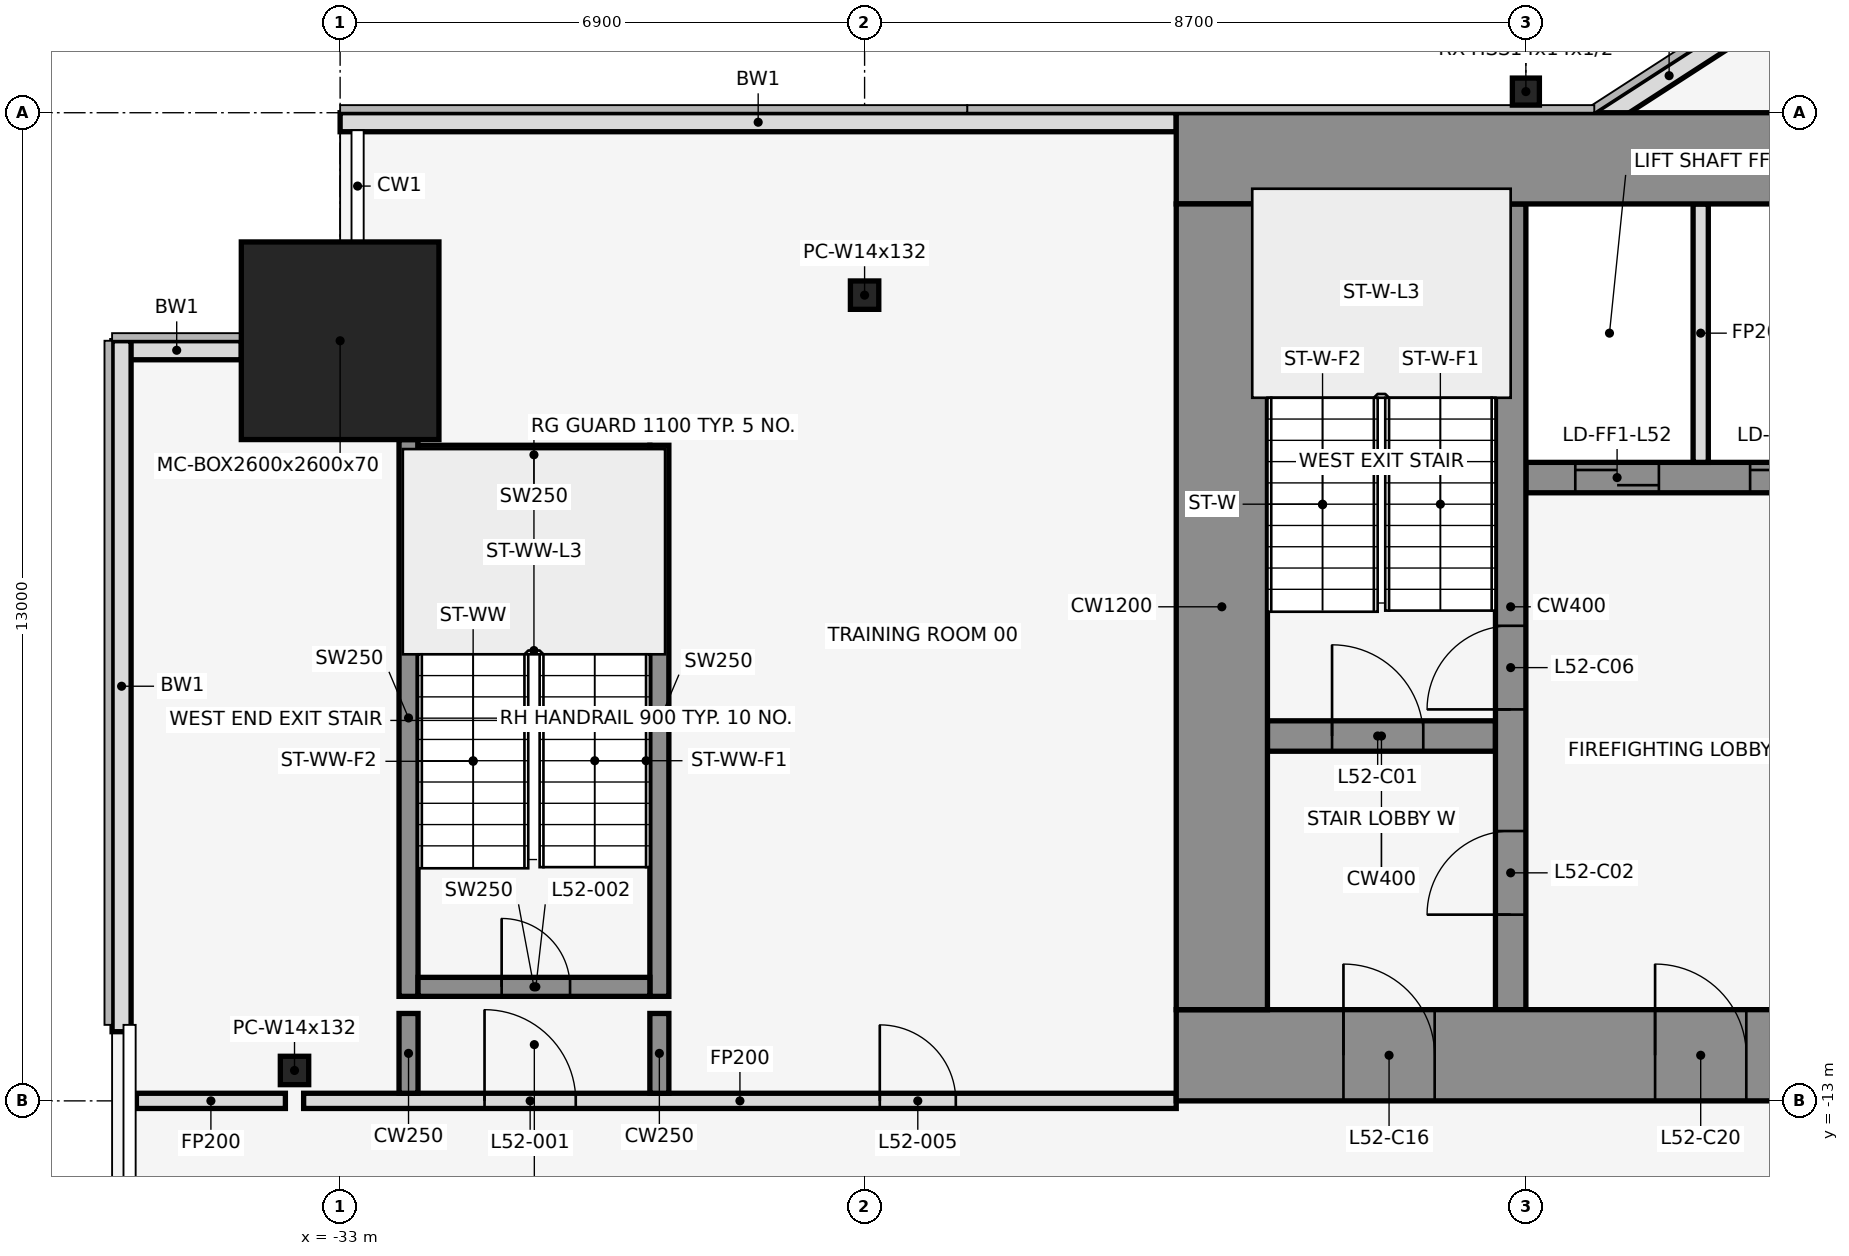
"""IFC4 building model, lengths in metres.
Left out: names, types, materials, properties, quantities, classifications, styles, units other than length and angle.
Written with IfcOpenShell. Run it as: python <this file> out.ifc"""

import sys

from ifc_helpers import new_model, si_unit, direction, frame, frame_2d, origin, origin_2d, place, context, subcontext, project, spatial, rectangle, hollow_rectangle, i_section, extrude, element, fill, save


model = new_model("IFC4")
c1 = context("Model", 3, precision=1e-05, world=origin(), true_north=direction((0.0, 1.0)))
c2 = subcontext(c1, "Body", "Model", "MODEL_VIEW")
j1 = project(units=[si_unit("LENGTHUNIT", "METRE"), si_unit("PLANEANGLEUNIT", "RADIAN")], contexts=[c1])
p1 = place(None, origin())
s1 = spatial("IfcSite", under=j1, at=p1, CompositionType="ELEMENT")
p2 = place(p1, origin())
s2 = spatial("IfcBuilding", under=s1, at=p2, CompositionType="ELEMENT")
p3 = place(p2, frame((0.0, 0.0, 231.9)))
s3 = spatial("IfcBuildingStorey", under=s2, at=p3, CompositionType="ELEMENT", Elevation=231.9)
p4 = place(p3, frame((-33.0, -3.0, 0.0), z_axis=(0.0, 0.0, 1.0), x_axis=(1.0, 0.0, 0.0)))
e1 = element("IfcColumn", 1, at=p4, inside=s3, PredefinedType="COLUMN", context=c2, shape_type="SweptSolid", body=[
    extrude(hollow_rectangle(XDim=2.6, YDim=2.6, WallThickness=0.07, at=origin_2d()), origin(), (0.0, 0.0, 1.0), 4.1),
])
p5 = place(p3, frame((-26.1, -2.4, 0.0), z_axis=(0.0, 0.0, 1.0), x_axis=(1.0, 0.0, 0.0)))
e2 = element("IfcColumn", 2, at=p5, inside=s3, PredefinedType="COLUMN", context=c2, shape_type="SweptSolid", body=[
    extrude(i_section(OverallWidth=0.373, OverallDepth=0.373, WebThickness=0.016, FlangeThickness=0.026, at=origin_2d()), origin(), (0.0, 0.0, 1.0), 4.1),
])
p6 = place(p3, frame((-17.4, 0.278, 0.0), z_axis=(0.0, 0.0, 1.0), x_axis=(1.0, 0.0, 0.0)))
e3 = element("IfcColumn", 3, at=p6, inside=s3, PredefinedType="COLUMN", context=c2, shape_type="SweptSolid", body=[
    extrude(hollow_rectangle(XDim=0.356, YDim=0.356, WallThickness=0.012, at=origin_2d()), origin(), (0.0, 0.0, 1.0), 4.1),
])
p7 = place(p3, frame((-33.6, -12.6, 0.0), z_axis=(0.0, 0.0, 1.0), x_axis=(1.0, 0.0, 0.0)))
e4 = element("IfcColumn", 4, at=p7, inside=s3, PredefinedType="COLUMN", context=c2, shape_type="SweptSolid", body=[
    extrude(i_section(OverallWidth=0.373, OverallDepth=0.373, WebThickness=0.016, FlangeThickness=0.026, at=origin_2d()), origin(), (0.0, 0.0, 1.0), 4.1),
])
p8 = place(p3, frame((-14.599, 1.08, 0.0), z_axis=(0.0, 0.0, 1.0), x_axis=(-0.83981312244, -0.542875602121, 0.0)))
e5 = element("IfcWall", 5, at=p8, inside=s3, PredefinedType="STANDARD", context=c2, shape_type="SweptSolid", body=[
    extrude(rectangle(XDim=2.183, YDim=0.25, at=frame_2d((1.091, 0.0))), origin(), (0.0, 0.0, 1.0), 3.9),
])
p9 = place(p3, frame((-22.0, -0.125, 0.0), z_axis=(0.0, 0.0, 1.0), x_axis=(-1.0, 0.0, 0.0)))
e6 = element("IfcWall", 6, at=p9, inside=s3, PredefinedType="STANDARD", context=c2, shape_type="SweptSolid", body=[
    extrude(rectangle(XDim=11.0, YDim=0.25, at=frame_2d((5.5, 0.0))), origin(), (0.0, 0.0, 1.0), 3.9),
])
p10 = place(p3, frame((-34.3, -3.125, 0.0), z_axis=(0.0, 0.0, 1.0), x_axis=(-1.0, 0.0, 0.0)))
e7 = element("IfcWall", 7, at=p10, inside=s3, PredefinedType="STANDARD", context=c2, shape_type="SweptSolid", body=[
    extrude(rectangle(XDim=1.7, YDim=0.25, at=frame_2d((0.85, 0.0))), origin(), (0.0, 0.0, 1.0), 3.9),
])
p11 = place(p3, frame((-35.875, -3.0, 0.0), z_axis=(0.0, 0.0, 1.0), x_axis=(0.0, -1.0, 0.0)))
e8 = element("IfcWall", 8, at=p11, inside=s3, PredefinedType="STANDARD", context=c2, shape_type="SweptSolid", body=[
    extrude(rectangle(XDim=9.09, YDim=0.25, at=frame_2d((4.545, 0.0))), origin(), (0.0, 0.0, 1.0), 3.9),
])
p12 = place(p3, frame((-32.1, -11.625, 0.0), z_axis=(0.0, 0.0, 1.0), x_axis=(0.0, 1.0, 0.0)))
e9 = element("IfcWall", 9, at=p12, inside=s3, PredefinedType="SHEAR", context=c2, shape_type="SweptSolid", body=[
    extrude(rectangle(XDim=7.325, YDim=0.25, at=frame_2d((3.663, 0.0))), origin(), (0.0, 0.0, 1.0), 4.1),
])
p13 = place(p3, frame((-28.8, -11.625, 0.0), z_axis=(0.0, 0.0, 1.0), x_axis=(0.0, 1.0, 0.0)))
e10 = element("IfcWall", 10, at=p13, inside=s3, PredefinedType="SHEAR", context=c2, shape_type="SweptSolid", body=[
    extrude(rectangle(XDim=7.25, YDim=0.25, at=frame_2d((3.625, 0.0))), origin(), (0.0, 0.0, 1.0), 4.1),
])
p14 = place(p3, frame((-31.975, -11.5, 0.0), z_axis=(0.0, 0.0, 1.0), x_axis=(1.0, 0.0, 0.0)))
e11 = element("IfcWall", 11, at=p14, inside=s3, PredefinedType="SHEAR", context=c2, shape_type="SweptSolid", body=[
    extrude(rectangle(XDim=3.05, YDim=0.25, at=frame_2d((1.525, 0.0))), origin(), (0.0, 0.0, 1.0), 4.1),
])
p15 = place(p14, frame((1.1, 0.0, 0.0)))
e12 = element("IfcOpeningElement", 12, at=p15, cuts=e11, PredefinedType="OPENING", context=c2, shape_type="SweptSolid", body=[
    extrude(rectangle(XDim=0.9, YDim=2.1, at=frame_2d((0.45, 1.05))), frame((0.0, 0.137, 0.0), z_axis=(0.0, -1.0, 0.0), x_axis=(1.0, 0.0, 0.0)), (0.0, 0.0, 1.0), 0.274),
])
p16 = place(p3, frame((-31.975, -4.5, 0.0), z_axis=(0.0, 0.0, 1.0), x_axis=(1.0, 0.0, 0.0)))
e13 = element("IfcWall", 13, at=p16, inside=s3, PredefinedType="SHEAR", context=c2, shape_type="SweptSolid", body=[
    extrude(rectangle(XDim=3.05, YDim=0.25, at=frame_2d((1.525, 0.0))), origin(), (0.0, 0.0, 1.0), 4.1),
])
p17 = place(p3, frame((-35.68, -13.0, 0.0), z_axis=(0.0, 0.0, 1.0), x_axis=(1.0, 0.0, 0.0)))
e14 = element("IfcWall", 14, at=p17, inside=s3, PredefinedType="PARTITIONING", context=c2, shape_type="SweptSolid", body=[
    extrude(rectangle(XDim=1.96, YDim=0.2, at=frame_2d((0.98, 0.0))), origin(), (0.0, 0.0, 1.0), 2.79),
])
p18 = place(p3, frame((-33.48, -13.0, 0.0), z_axis=(0.0, 0.0, 1.0), x_axis=(1.0, 0.0, 0.0)))
e15 = element("IfcWall", 15, at=p18, inside=s3, PredefinedType="PARTITIONING", context=c2, shape_type="SweptSolid", body=[
    extrude(rectangle(XDim=11.48, YDim=0.2, at=frame_2d((5.74, 0.0))), origin(), (0.0, 0.0, 1.0), 2.79),
])
p19 = place(p18, frame((2.38, 0.0, 0.0)))
e16 = element("IfcOpeningElement", 16, at=p19, cuts=e15, PredefinedType="OPENING", context=c2, shape_type="SweptSolid", body=[
    extrude(rectangle(XDim=1.2, YDim=2.1, at=frame_2d((0.6, 1.05))), frame((0.0, 0.112, 0.0), z_axis=(0.0, -1.0, 0.0), x_axis=(1.0, 0.0, 0.0)), (0.0, 0.0, 1.0), 0.224),
])
p20 = place(p18, frame((7.58, 0.0, 0.0)))
e17 = element("IfcOpeningElement", 17, at=p20, cuts=e15, PredefinedType="OPENING", context=c2, shape_type="SweptSolid", body=[
    extrude(rectangle(XDim=1.0, YDim=2.1, at=frame_2d((0.5, 1.05))), frame((0.0, 0.112, 0.0), z_axis=(0.0, -1.0, 0.0), x_axis=(1.0, 0.0, 0.0)), (0.0, 0.0, 1.0), 0.224),
])
for number, where, z_axis, x_axis in (
    (18, (-32.1, -12.9, 0.0), (0.0, 0.0, 1.0), (0.0, 1.0, 0.0)),
    (19, (-28.8, -12.9, 0.0), (0.0, 0.0, 1.0), (0.0, 1.0, 0.0)),
):
    element("IfcWall", number, at=place(p3, frame(where, z_axis=z_axis, x_axis=x_axis)), inside=s3, PredefinedType="SHEAR", context=c2, shape_type="SweptSolid", body=[
        extrude(rectangle(XDim=1.05, YDim=0.25, at=frame_2d((0.525, 0.0))), origin(), (0.0, 0.0, 1.0), 4.1),
    ])
p21 = place(p3, frame((-20.8, -8.2, 0.0), z_axis=(0.0, 0.0, 1.0), x_axis=(1.0, 0.0, 0.0)))
e20 = element("IfcWall", 20, at=p21, inside=s3, PredefinedType="SHEAR", context=c2, shape_type="SweptSolid", body=[
    extrude(rectangle(XDim=3.0, YDim=0.4, at=frame_2d((1.5, 0.0))), origin(), (0.0, 0.0, 1.0), 4.1),
])
p22 = place(p21, frame((0.85, 0.0, 0.0)))
e21 = element("IfcOpeningElement", 21, at=p22, cuts=e20, PredefinedType="OPENING", context=c2, shape_type="SweptSolid", body=[
    extrude(rectangle(XDim=1.2, YDim=2.1, at=frame_2d((0.6, 1.05))), frame((0.0, 0.212, 0.0), z_axis=(0.0, -1.0, 0.0), x_axis=(1.0, 0.0, 0.0)), (0.0, 0.0, 1.0), 0.424),
])
p23 = place(p3, frame((-17.4, -4.8, 0.0), z_axis=(0.0, 0.0, 1.0), x_axis=(1.0, 0.0, 0.0)))
e22 = element("IfcWall", 22, at=p23, inside=s3, PredefinedType="SHEAR", context=c2, shape_type="SweptSolid", body=[
    extrude(rectangle(XDim=13.6, YDim=0.4, at=frame_2d((6.8, 0.0))), origin(), (0.0, 0.0, 1.0), 4.1),
])
p24 = place(p23, frame((0.65, 0.0, 0.0)))
e23 = element("IfcOpeningElement", 23, at=p24, cuts=e22, PredefinedType="OPENING", context=c2, shape_type="SweptSolid", body=[
    extrude(rectangle(XDim=1.1, YDim=2.1, at=frame_2d((0.55, 1.05))), frame((0.0, 0.212, 0.0), z_axis=(0.0, -1.0, 0.0), x_axis=(1.0, 0.0, 0.0)), (0.0, 0.0, 1.0), 0.424),
])
p25 = place(p23, frame((2.95, 0.0, 0.0)))
e24 = element("IfcOpeningElement", 24, at=p25, cuts=e22, PredefinedType="OPENING", context=c2, shape_type="SweptSolid", body=[
    extrude(rectangle(XDim=1.1, YDim=2.1, at=frame_2d((0.55, 1.05))), frame((0.0, 0.212, 0.0), z_axis=(0.0, -1.0, 0.0), x_axis=(1.0, 0.0, 0.0)), (0.0, 0.0, 1.0), 0.424),
])
p26 = place(p23, frame((8.75, 0.0, 0.0)))
e25 = element("IfcOpeningElement", 25, at=p26, cuts=e22, PredefinedType="OPENING", context=c2, shape_type="SweptSolid", body=[
    extrude(rectangle(XDim=0.9, YDim=2.1, at=frame_2d((0.45, 1.05))), frame((0.0, 0.212, 0.0), z_axis=(0.0, -1.0, 0.0), x_axis=(1.0, 0.0, 0.0)), (0.0, 0.0, 1.0), 0.424),
])
p27 = place(p3, frame((-17.6, -11.8, 0.0), z_axis=(0.0, 0.0, 1.0), x_axis=(0.0, 1.0, 0.0)))
e26 = element("IfcWall", 26, at=p27, inside=s3, PredefinedType="SHEAR", context=c2, shape_type="SweptSolid", body=[
    extrude(rectangle(XDim=10.6, YDim=0.4, at=frame_2d((5.3, 0.0))), origin(), (0.0, 0.0, 1.0), 4.1),
])
p28 = place(p27, frame((1.25, 0.0, 0.0)))
e27 = element("IfcOpeningElement", 27, at=p28, cuts=e26, PredefinedType="OPENING", context=c2, shape_type="SweptSolid", body=[
    extrude(rectangle(XDim=1.1, YDim=2.1, at=frame_2d((0.55, 1.05))), frame((0.0, 0.212, 0.0), z_axis=(0.0, -1.0, 0.0), x_axis=(1.0, 0.0, 0.0)), (0.0, 0.0, 1.0), 0.424),
])
p29 = place(p27, frame((3.95, 0.0, 0.0)))
e28 = element("IfcOpeningElement", 28, at=p29, cuts=e26, PredefinedType="OPENING", context=c2, shape_type="SweptSolid", body=[
    extrude(rectangle(XDim=1.1, YDim=2.1, at=frame_2d((0.55, 1.05))), frame((0.0, 0.212, 0.0), z_axis=(0.0, -1.0, 0.0), x_axis=(1.0, 0.0, 0.0)), (0.0, 0.0, 1.0), 0.424),
])
p30 = place(p3, frame((-15.1, -4.6, 0.0), z_axis=(0.0, 0.0, 1.0), x_axis=(0.0, 1.0, 0.0)))
e29 = element("IfcWall", 29, at=p30, inside=s3, PredefinedType="PARTITIONING", context=c2, shape_type="SweptSolid", body=[
    extrude(rectangle(XDim=3.4, YDim=0.2, at=frame_2d((1.7, 0.0))), origin(), (0.0, 0.0, 1.0), 2.79),
])
p31 = place(p3, frame((-22.0, -0.6, 0.0), z_axis=(0.0, 0.0, 1.0), x_axis=(1.0, 0.0, 0.0)))
e30 = element("IfcWall", 30, at=p31, inside=s3, PredefinedType="SHEAR", context=c2, shape_type="SweptSolid", body=[
    extrude(rectangle(XDim=44.0, YDim=1.2, at=frame_2d((22.0, 0.0))), origin(), (0.0, 0.0, 1.0), 4.1),
])
p32 = place(p31, frame((18.55, 0.0, 0.0)))
e31 = element("IfcOpeningElement", 31, at=p32, cuts=e30, PredefinedType="OPENING", context=c2, shape_type="SweptSolid", body=[
    extrude(rectangle(XDim=0.9, YDim=2.1, at=frame_2d((0.45, 1.05))), frame((0.0, 0.612, 0.0), z_axis=(0.0, -1.0, 0.0), x_axis=(1.0, 0.0, 0.0)), (0.0, 0.0, 1.0), 1.224),
])
p33 = place(p31, frame((24.55, 0.0, 0.0)))
e32 = element("IfcOpeningElement", 32, at=p33, cuts=e30, PredefinedType="OPENING", context=c2, shape_type="SweptSolid", body=[
    extrude(rectangle(XDim=0.9, YDim=2.1, at=frame_2d((0.45, 1.05))), frame((0.0, 0.612, 0.0), z_axis=(0.0, -1.0, 0.0), x_axis=(1.0, 0.0, 0.0)), (0.0, 0.0, 1.0), 1.224),
])
p34 = place(p3, frame((-22.0, -12.4, 0.0), z_axis=(0.0, 0.0, 1.0), x_axis=(1.0, 0.0, 0.0)))
e33 = element("IfcWall", 33, at=p34, inside=s3, PredefinedType="SHEAR", context=c2, shape_type="SweptSolid", body=[
    extrude(rectangle(XDim=44.0, YDim=1.2, at=frame_2d((22.0, 0.0))), origin(), (0.0, 0.0, 1.0), 4.1),
])
p35 = place(p34, frame((2.2, 0.0, 0.0)))
e34 = element("IfcOpeningElement", 34, at=p35, cuts=e33, PredefinedType="OPENING", context=c2, shape_type="SweptSolid", body=[
    extrude(rectangle(XDim=1.2, YDim=2.1, at=frame_2d((0.6, 1.05))), frame((0.0, 0.612, 0.0), z_axis=(0.0, -1.0, 0.0), x_axis=(1.0, 0.0, 0.0)), (0.0, 0.0, 1.0), 1.224),
])
p36 = place(p34, frame((21.4, 0.0, 0.0)))
e35 = element("IfcOpeningElement", 35, at=p36, cuts=e33, PredefinedType="OPENING", context=c2, shape_type="SweptSolid", body=[
    extrude(rectangle(XDim=1.2, YDim=2.1, at=frame_2d((0.6, 1.05))), frame((0.0, 0.612, 0.0), z_axis=(0.0, -1.0, 0.0), x_axis=(1.0, 0.0, 0.0)), (0.0, 0.0, 1.0), 1.224),
])
p37 = place(p34, frame((40.6, 0.0, 0.0)))
e36 = element("IfcOpeningElement", 36, at=p37, cuts=e33, PredefinedType="OPENING", context=c2, shape_type="SweptSolid", body=[
    extrude(rectangle(XDim=1.2, YDim=2.1, at=frame_2d((0.6, 1.05))), frame((0.0, 0.612, 0.0), z_axis=(0.0, -1.0, 0.0), x_axis=(1.0, 0.0, 0.0)), (0.0, 0.0, 1.0), 1.224),
])
p38 = place(p34, frame((16.0, 0.0, 0.0)))
e37 = element("IfcOpeningElement", 37, at=p38, cuts=e33, PredefinedType="OPENING", context=c2, shape_type="SweptSolid", body=[
    extrude(rectangle(XDim=1.8, YDim=2.1, at=frame_2d((0.9, 1.05))), frame((0.0, 0.612, 0.0), z_axis=(0.0, -1.0, 0.0), x_axis=(1.0, 0.0, 0.0)), (0.0, 0.0, 1.0), 1.224),
])
p39 = place(p34, frame((6.3, 0.0, 0.0)))
e38 = element("IfcOpeningElement", 38, at=p39, cuts=e33, PredefinedType="OPENING", context=c2, shape_type="SweptSolid", body=[
    extrude(rectangle(XDim=1.2, YDim=2.1, at=frame_2d((0.6, 1.05))), frame((0.0, 0.612, 0.0), z_axis=(0.0, -1.0, 0.0), x_axis=(1.0, 0.0, 0.0)), (0.0, 0.0, 1.0), 1.224),
])
p40 = place(p34, frame((26.2, 0.0, 0.0)))
e39 = element("IfcOpeningElement", 39, at=p40, cuts=e33, PredefinedType="OPENING", context=c2, shape_type="SweptSolid", body=[
    extrude(rectangle(XDim=1.8, YDim=2.1, at=frame_2d((0.9, 1.05))), frame((0.0, 0.612, 0.0), z_axis=(0.0, -1.0, 0.0), x_axis=(1.0, 0.0, 0.0)), (0.0, 0.0, 1.0), 1.224),
])
p41 = place(p34, frame((36.5, 0.0, 0.0)))
e40 = element("IfcOpeningElement", 40, at=p41, cuts=e33, PredefinedType="OPENING", context=c2, shape_type="SweptSolid", body=[
    extrude(rectangle(XDim=1.2, YDim=2.1, at=frame_2d((0.6, 1.05))), frame((0.0, 0.612, 0.0), z_axis=(0.0, -1.0, 0.0), x_axis=(1.0, 0.0, 0.0)), (0.0, 0.0, 1.0), 1.224),
])
p42 = place(p3, frame((-21.4, -11.8, 0.0), z_axis=(0.0, 0.0, 1.0), x_axis=(0.0, 1.0, 0.0)))
e41 = element("IfcWall", 41, at=p42, inside=s3, PredefinedType="SHEAR", context=c2, shape_type="SweptSolid", body=[
    extrude(rectangle(XDim=10.6, YDim=1.2, at=frame_2d((5.3, 0.0))), origin(), (0.0, 0.0, 1.0), 4.1),
])
p43 = place(p19, origin())
e42 = element("IfcDoor", 42, at=p43, inside=s3, OperationType="SINGLE_SWING_LEFT", PredefinedType="DOOR", context=c2, shape_type="SweptSolid", body=[
    extrude(rectangle(XDim=1.2, YDim=2.1, at=frame_2d((0.6, 1.05))), frame((0.0, 0.025, 0.0), z_axis=(0.0, -1.0, 0.0), x_axis=(1.0, 0.0, 0.0)), (0.0, 0.0, 1.0), 0.05),
])
fill(e16, e42)
p44 = place(p15, origin())
e43 = element("IfcDoor", 43, at=p44, inside=s3, OperationType="SINGLE_SWING_LEFT", PredefinedType="DOOR", context=c2, shape_type="SweptSolid", body=[
    extrude(rectangle(XDim=0.9, YDim=2.1, at=frame_2d((0.45, 1.05))), frame((0.0, 0.025, 0.0), z_axis=(0.0, -1.0, 0.0), x_axis=(1.0, 0.0, 0.0)), (0.0, 0.0, 1.0), 0.05),
])
fill(e12, e43)
p45 = place(p20, origin())
e44 = element("IfcDoor", 44, at=p45, inside=s3, OperationType="SINGLE_SWING_LEFT", PredefinedType="DOOR", context=c2, shape_type="SweptSolid", body=[
    extrude(rectangle(XDim=1.0, YDim=2.1, at=frame_2d((0.5, 1.05))), frame((0.0, 0.025, 0.0), z_axis=(0.0, -1.0, 0.0), x_axis=(1.0, 0.0, 0.0)), (0.0, 0.0, 1.0), 0.05),
])
fill(e17, e44)
p46 = place(p22, origin())
e45 = element("IfcDoor", 45, at=p46, inside=s3, OperationType="SINGLE_SWING_LEFT", PredefinedType="DOOR", context=c2, shape_type="SweptSolid", body=[
    extrude(rectangle(XDim=1.2, YDim=2.1, at=frame_2d((0.6, 1.05))), frame((0.0, 0.025, 0.0), z_axis=(0.0, -1.0, 0.0), x_axis=(1.0, 0.0, 0.0)), (0.0, 0.0, 1.0), 0.05),
])
fill(e21, e45)
p47 = place(p28, frame((1.1, 0.0, 0.0), z_axis=(0.0, 0.0, 1.0), x_axis=(-1.0, 0.0, 0.0)))
e46 = element("IfcDoor", 46, at=p47, inside=s3, OperationType="SINGLE_SWING_LEFT", PredefinedType="DOOR", context=c2, shape_type="SweptSolid", body=[
    extrude(rectangle(XDim=1.1, YDim=2.1, at=frame_2d((0.55, 1.05))), frame((0.0, 0.025, 0.0), z_axis=(0.0, -1.0, 0.0), x_axis=(1.0, 0.0, 0.0)), (0.0, 0.0, 1.0), 0.05),
])
fill(e27, e46)
p48 = place(p24, origin())
e47 = element("IfcDoor", 47, at=p48, inside=s3, OperationType="DOUBLE_DOOR_SLIDING", PredefinedType="DOOR", context=c2, shape_type="SweptSolid", body=[
    extrude(rectangle(XDim=1.1, YDim=2.1, at=frame_2d((0.55, 1.05))), frame((0.0, 0.025, 0.0), z_axis=(0.0, -1.0, 0.0), x_axis=(1.0, 0.0, 0.0)), (0.0, 0.0, 1.0), 0.05),
])
fill(e23, e47)
p49 = place(p25, origin())
e48 = element("IfcDoor", 48, at=p49, inside=s3, OperationType="DOUBLE_DOOR_SLIDING", PredefinedType="DOOR", context=c2, shape_type="SweptSolid", body=[
    extrude(rectangle(XDim=1.1, YDim=2.1, at=frame_2d((0.55, 1.05))), frame((0.0, 0.025, 0.0), z_axis=(0.0, -1.0, 0.0), x_axis=(1.0, 0.0, 0.0)), (0.0, 0.0, 1.0), 0.05),
])
fill(e24, e48)
p50 = place(p29, frame((1.1, 0.0, 0.0), z_axis=(0.0, 0.0, 1.0), x_axis=(-1.0, 0.0, 0.0)))
e49 = element("IfcDoor", 49, at=p50, inside=s3, OperationType="SINGLE_SWING_LEFT", PredefinedType="DOOR", context=c2, shape_type="SweptSolid", body=[
    extrude(rectangle(XDim=1.1, YDim=2.1, at=frame_2d((0.55, 1.05))), frame((0.0, 0.025, 0.0), z_axis=(0.0, -1.0, 0.0), x_axis=(1.0, 0.0, 0.0)), (0.0, 0.0, 1.0), 0.05),
])
fill(e28, e49)
p51 = place(p35, frame((1.2, 0.0, 0.0), z_axis=(0.0, 0.0, 1.0), x_axis=(-1.0, 0.0, 0.0)))
e50 = element("IfcDoor", 50, at=p51, inside=s3, OperationType="SINGLE_SWING_RIGHT", PredefinedType="DOOR", context=c2, shape_type="SweptSolid", body=[
    extrude(rectangle(XDim=1.2, YDim=2.1, at=frame_2d((0.6, 1.05))), frame((0.0, 0.025, 0.0), z_axis=(0.0, -1.0, 0.0), x_axis=(1.0, 0.0, 0.0)), (0.0, 0.0, 1.0), 0.05),
])
fill(e34, e50)
p52 = place(p39, frame((1.2, 0.0, 0.0), z_axis=(0.0, 0.0, 1.0), x_axis=(-1.0, 0.0, 0.0)))
e51 = element("IfcDoor", 51, at=p52, inside=s3, OperationType="SINGLE_SWING_RIGHT", PredefinedType="DOOR", context=c2, shape_type="SweptSolid", body=[
    extrude(rectangle(XDim=1.2, YDim=2.1, at=frame_2d((0.6, 1.05))), frame((0.0, 0.025, 0.0), z_axis=(0.0, -1.0, 0.0), x_axis=(1.0, 0.0, 0.0)), (0.0, 0.0, 1.0), 0.05),
])
fill(e38, e51)
save(model, sys.argv[1])
